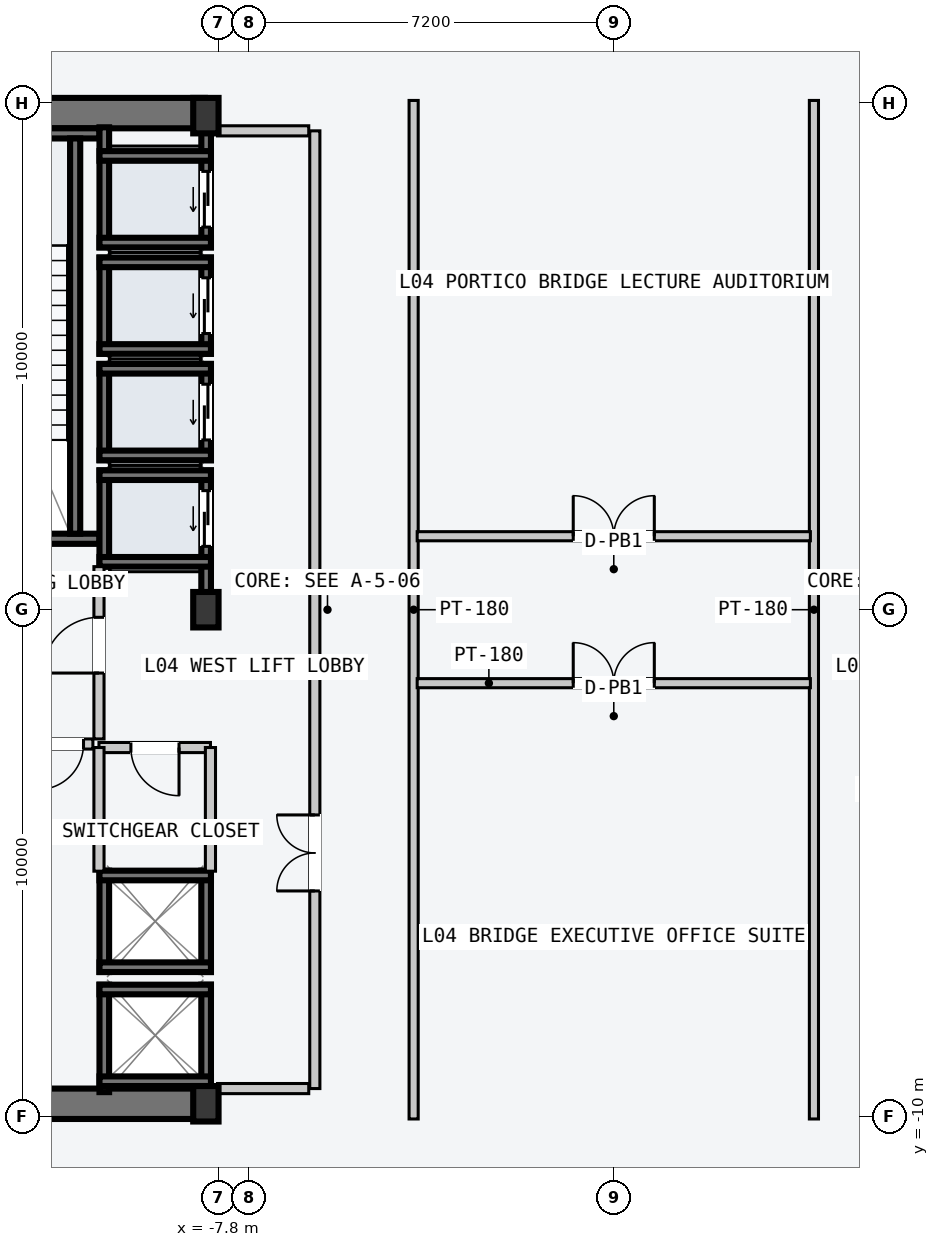
"""IFC4 building model, lengths in metres.
Left out: names, types, materials, properties, quantities, classifications, styles, units other than length and angle.
Written with IfcOpenShell. Run it as: python <this file> out.ifc"""

import sys

from ifc_helpers import new_model, si_unit, direction, frame, frame_2d, origin, origin_2d, place, context, subcontext, project, spatial, rectangle, i_section, extrude, element, fill, save


model = new_model("IFC4")
c1 = context("Model", 3, precision=1e-05, world=origin(), true_north=direction((0.0, 1.0)))
c2 = subcontext(c1, "Body", "Model", "MODEL_VIEW")
j1 = project(units=[si_unit("LENGTHUNIT", "METRE"), si_unit("PLANEANGLEUNIT", "RADIAN")], contexts=[c1])
p1 = place(None, origin())
s1 = spatial("IfcSite", under=j1, at=p1, CompositionType="ELEMENT")
p2 = place(p1, origin())
s2 = spatial("IfcBuilding", under=s1, at=p2, CompositionType="ELEMENT")
p3 = place(p2, frame((0.0, 0.0, 19.2)))
s3 = spatial("IfcBuildingStorey", under=s2, at=p3, CompositionType="ELEMENT", Elevation=19.2)
for number, where, z_axis, x_axis in (
    (1, (-14.53, -9.75, -0.22), (0.0, 0.0, 1.0), (1.0, 0.0, 0.0)),
    (2, (-14.53, 9.8, -0.22), (0.0, 0.0, 1.0), (1.0, 0.0, 0.0)),
):
    element("IfcWall", number, at=place(p3, frame(where, z_axis=z_axis, x_axis=x_axis)), inside=s3, PredefinedType="SHEAR", context=c2, shape_type="SweptSolid", body=[
        extrude(rectangle(XDim=6.46, YDim=0.6, at=frame_2d((3.23, 0.0))), origin(), (0.0, 0.0, 1.0), 4.82),
    ])
p4 = place(p3, frame((-14.25, 1.4, -0.22), z_axis=(0.0, 0.0, 1.0), x_axis=(1.0, 0.0, 0.0)))
e3 = element("IfcWall", 3, at=p4, inside=s3, PredefinedType="SOLIDWALL", context=c2, shape_type="SweptSolid", body=[
    extrude(rectangle(XDim=4.1, YDim=0.2, at=frame_2d((2.05, 0.0))), origin(), (0.0, 0.0, 1.0), 4.82),
])
p5 = place(p4, frame((1.5, 0.0, 0.22)))
e4 = element("IfcOpeningElement", 4, at=p5, cuts=e3, PredefinedType="OPENING", context=c2, shape_type="SweptSolid", body=[
    extrude(rectangle(XDim=1.12, YDim=2.18, at=frame_2d((0.56, 1.09))), frame((0.0, 0.11, 0.0), z_axis=(0.0, -1.0, 0.0), x_axis=(1.0, 0.0, 0.0)), (0.0, 0.0, 1.0), 0.22),
])
p6 = place(p3, frame((-14.25, 9.4, -0.22), z_axis=(0.0, 0.0, 1.0), x_axis=(1.0, 0.0, 0.0)))
e5 = element("IfcWall", 5, at=p6, inside=s3, PredefinedType="SOLIDWALL", context=c2, shape_type="SweptSolid", body=[
    extrude(rectangle(XDim=4.1, YDim=0.2, at=frame_2d((2.05, 0.0))), origin(), (0.0, 0.0, 1.0), 4.82),
])
p7 = place(p3, frame((-10.63, 1.5, -0.22), z_axis=(0.0, 0.0, 1.0), x_axis=(0.0, 1.0, 0.0)))
e6 = element("IfcWall", 6, at=p7, inside=s3, PredefinedType="SOLIDWALL", context=c2, shape_type="SweptSolid", body=[
    extrude(rectangle(XDim=7.8, YDim=0.2, at=frame_2d((3.9, 0.0))), origin(), (0.0, 0.0, 1.0), 4.82),
])
for number, where, z_axis, x_axis in (
    (7, (-8.05, -9.75, 0.0), (0.0, 0.0, 1.0), (1.0, 0.0, 0.0)),
    (8, (-8.05, 0.0, 0.0), (0.0, 0.0, 1.0), (1.0, 0.0, 0.0)),
    (9, (-8.05, 9.75, 0.0), (0.0, 0.0, 1.0), (1.0, 0.0, 0.0)),
):
    element("IfcColumn", number, at=place(p3, frame(where, z_axis=z_axis, x_axis=x_axis)), inside=s3, PredefinedType="COLUMN", context=c2, shape_type="SweptSolid", body=[
        extrude(i_section(OverallWidth=0.5, OverallDepth=0.7, WebThickness=0.028, FlangeThickness=0.045, at=origin_2d()), origin(), (0.0, 0.0, 1.0), 4.8),
    ])
p8 = place(p3, frame((-8.045, 0.21, -0.22), z_axis=(0.0, 0.0, 1.0), x_axis=(0.0, 1.0, 0.0)))
e10 = element("IfcWall", 10, at=p8, inside=s3, PredefinedType="SOLIDWALL", context=c2, shape_type="SweptSolid", body=[
    extrude(rectangle(XDim=2.54, YDim=0.19, at=frame_2d((1.27, 0.0))), origin(), (0.0, 0.0, 1.0), 4.82),
])
p9 = place(p8, frame((1.04, 0.0, 0.22)))
e11 = element("IfcOpeningElement", 11, at=p9, cuts=e10, PredefinedType="OPENING", context=c2, shape_type="SweptSolid", body=[
    extrude(rectangle(XDim=1.1, YDim=2.2, at=frame_2d((0.55, 1.1))), frame((0.0, 0.105, 0.0), z_axis=(0.0, -1.0, 0.0), x_axis=(1.0, 0.0, 0.0)), (0.0, 0.0, 1.0), 0.21),
])
p10 = place(p3, frame((-10.055, 0.85, -0.22), z_axis=(0.0, 0.0, 1.0), x_axis=(0.0, 1.0, 0.0)))
e12 = element("IfcWall", 12, at=p10, inside=s3, PredefinedType="SOLIDWALL", context=c2, shape_type="SweptSolid", body=[
    extrude(rectangle(XDim=1.9, YDim=0.19, at=frame_2d((0.95, 0.0))), origin(), (0.0, 0.0, 1.0), 4.82),
])
for number, where, z_axis, x_axis in (
    (13, (-10.15, 2.655, -0.22), (0.0, 0.0, 1.0), (1.0, 0.0, 0.0)),
    (14, (-10.15, 0.945, -0.22), (0.0, 0.0, 1.0), (1.0, 0.0, 0.0)),
):
    element("IfcWall", number, at=place(p3, frame(where, z_axis=z_axis, x_axis=x_axis)), inside=s3, PredefinedType="SOLIDWALL", context=c2, shape_type="SweptSolid", body=[
        extrude(rectangle(XDim=2.2, YDim=0.19, at=frame_2d((1.1, 0.0))), origin(), (0.0, 0.0, 1.0), 4.82),
    ])
p11 = place(p3, frame((-8.045, 2.95, -0.22), z_axis=(0.0, 0.0, 1.0), x_axis=(0.0, 1.0, 0.0)))
e15 = element("IfcWall", 15, at=p11, inside=s3, PredefinedType="SOLIDWALL", context=c2, shape_type="SweptSolid", body=[
    extrude(rectangle(XDim=1.9, YDim=0.19, at=frame_2d((0.95, 0.0))), origin(), (0.0, 0.0, 1.0), 4.82),
])
p12 = place(p11, frame((0.4, 0.0, 0.22)))
e16 = element("IfcOpeningElement", 16, at=p12, cuts=e15, PredefinedType="OPENING", context=c2, shape_type="SweptSolid", body=[
    extrude(rectangle(XDim=1.1, YDim=2.2, at=frame_2d((0.55, 1.1))), frame((0.0, 0.105, 0.0), z_axis=(0.0, -1.0, 0.0), x_axis=(1.0, 0.0, 0.0)), (0.0, 0.0, 1.0), 0.21),
])
p13 = place(p3, frame((-10.055, 2.95, -0.22), z_axis=(0.0, 0.0, 1.0), x_axis=(0.0, 1.0, 0.0)))
e17 = element("IfcWall", 17, at=p13, inside=s3, PredefinedType="SOLIDWALL", context=c2, shape_type="SweptSolid", body=[
    extrude(rectangle(XDim=1.9, YDim=0.19, at=frame_2d((0.95, 0.0))), origin(), (0.0, 0.0, 1.0), 4.82),
])
for number, where, z_axis, x_axis in (
    (18, (-10.15, 4.755, -0.22), (0.0, 0.0, 1.0), (1.0, 0.0, 0.0)),
    (19, (-10.15, 3.045, -0.22), (0.0, 0.0, 1.0), (1.0, 0.0, 0.0)),
):
    element("IfcWall", number, at=place(p3, frame(where, z_axis=z_axis, x_axis=x_axis)), inside=s3, PredefinedType="SOLIDWALL", context=c2, shape_type="SweptSolid", body=[
        extrude(rectangle(XDim=2.2, YDim=0.19, at=frame_2d((1.1, 0.0))), origin(), (0.0, 0.0, 1.0), 4.82),
    ])
p14 = place(p3, frame((-8.045, 5.05, -0.22), z_axis=(0.0, 0.0, 1.0), x_axis=(0.0, 1.0, 0.0)))
e20 = element("IfcWall", 20, at=p14, inside=s3, PredefinedType="SOLIDWALL", context=c2, shape_type="SweptSolid", body=[
    extrude(rectangle(XDim=1.9, YDim=0.19, at=frame_2d((0.95, 0.0))), origin(), (0.0, 0.0, 1.0), 4.82),
])
p15 = place(p14, frame((0.4, 0.0, 0.22)))
e21 = element("IfcOpeningElement", 21, at=p15, cuts=e20, PredefinedType="OPENING", context=c2, shape_type="SweptSolid", body=[
    extrude(rectangle(XDim=1.1, YDim=2.2, at=frame_2d((0.55, 1.1))), frame((0.0, 0.105, 0.0), z_axis=(0.0, -1.0, 0.0), x_axis=(1.0, 0.0, 0.0)), (0.0, 0.0, 1.0), 0.21),
])
p16 = place(p3, frame((-10.055, 5.05, -0.22), z_axis=(0.0, 0.0, 1.0), x_axis=(0.0, 1.0, 0.0)))
e22 = element("IfcWall", 22, at=p16, inside=s3, PredefinedType="SOLIDWALL", context=c2, shape_type="SweptSolid", body=[
    extrude(rectangle(XDim=1.9, YDim=0.19, at=frame_2d((0.95, 0.0))), origin(), (0.0, 0.0, 1.0), 4.82),
])
for number, where, z_axis, x_axis in (
    (23, (-10.15, 6.855, -0.22), (0.0, 0.0, 1.0), (1.0, 0.0, 0.0)),
    (24, (-10.15, 5.145, -0.22), (0.0, 0.0, 1.0), (1.0, 0.0, 0.0)),
):
    element("IfcWall", number, at=place(p3, frame(where, z_axis=z_axis, x_axis=x_axis)), inside=s3, PredefinedType="SOLIDWALL", context=c2, shape_type="SweptSolid", body=[
        extrude(rectangle(XDim=2.2, YDim=0.19, at=frame_2d((1.1, 0.0))), origin(), (0.0, 0.0, 1.0), 4.82),
    ])
p17 = place(p3, frame((-8.045, 7.15, -0.22), z_axis=(0.0, 0.0, 1.0), x_axis=(0.0, 1.0, 0.0)))
e25 = element("IfcWall", 25, at=p17, inside=s3, PredefinedType="SOLIDWALL", context=c2, shape_type="SweptSolid", body=[
    extrude(rectangle(XDim=2.37, YDim=0.19, at=frame_2d((1.185, 0.0))), origin(), (0.0, 0.0, 1.0), 4.82),
])
p18 = place(p17, frame((0.4, 0.0, 0.22)))
e26 = element("IfcOpeningElement", 26, at=p18, cuts=e25, PredefinedType="OPENING", context=c2, shape_type="SweptSolid", body=[
    extrude(rectangle(XDim=1.1, YDim=2.2, at=frame_2d((0.55, 1.1))), frame((0.0, 0.105, 0.0), z_axis=(0.0, -1.0, 0.0), x_axis=(1.0, 0.0, 0.0)), (0.0, 0.0, 1.0), 0.21),
])
p19 = place(p3, frame((-10.055, 7.15, -0.22), z_axis=(0.0, 0.0, 1.0), x_axis=(0.0, 1.0, 0.0)))
e27 = element("IfcWall", 27, at=p19, inside=s3, PredefinedType="SOLIDWALL", context=c2, shape_type="SweptSolid", body=[
    extrude(rectangle(XDim=2.37, YDim=0.19, at=frame_2d((1.185, 0.0))), origin(), (0.0, 0.0, 1.0), 4.82),
])
for number, where, z_axis, x_axis in (
    (28, (-10.15, 8.955, -0.22), (0.0, 0.0, 1.0), (1.0, 0.0, 0.0)),
    (29, (-10.15, 7.245, -0.22), (0.0, 0.0, 1.0), (1.0, 0.0, 0.0)),
):
    element("IfcWall", number, at=place(p3, frame(where, z_axis=z_axis, x_axis=x_axis)), inside=s3, PredefinedType="SOLIDWALL", context=c2, shape_type="SweptSolid", body=[
        extrude(rectangle(XDim=2.2, YDim=0.19, at=frame_2d((1.1, 0.0))), origin(), (0.0, 0.0, 1.0), 4.82),
    ])
for number, where, z_axis, x_axis in (
    (30, (-8.045, -9.52, -0.22), (0.0, 0.0, 1.0), (0.0, 1.0, 0.0)),
    (31, (-10.055, -9.52, -0.22), (0.0, 0.0, 1.0), (0.0, 1.0, 0.0)),
):
    element("IfcWall", number, at=place(p3, frame(where, z_axis=z_axis, x_axis=x_axis)), inside=s3, PredefinedType="SOLIDWALL", context=c2, shape_type="SweptSolid", body=[
        extrude(rectangle(XDim=2.12, YDim=0.19, at=frame_2d((1.06, 0.0))), origin(), (0.0, 0.0, 1.0), 4.82),
    ])
for number, where, z_axis, x_axis in (
    (32, (-10.15, -7.495, -0.22), (0.0, 0.0, 1.0), (1.0, 0.0, 0.0)),
    (33, (-10.15, -9.305, -0.22), (0.0, 0.0, 1.0), (1.0, 0.0, 0.0)),
):
    element("IfcWall", number, at=place(p3, frame(where, z_axis=z_axis, x_axis=x_axis)), inside=s3, PredefinedType="SOLIDWALL", context=c2, shape_type="SweptSolid", body=[
        extrude(rectangle(XDim=2.2, YDim=0.19, at=frame_2d((1.1, 0.0))), origin(), (0.0, 0.0, 1.0), 4.82),
    ])
for number, where, z_axis, x_axis in (
    (34, (-8.045, -7.15, -0.22), (0.0, 0.0, 1.0), (0.0, 1.0, 0.0)),
    (35, (-10.055, -7.15, -0.22), (0.0, 0.0, 1.0), (0.0, 1.0, 0.0)),
):
    element("IfcWall", number, at=place(p3, frame(where, z_axis=z_axis, x_axis=x_axis)), inside=s3, PredefinedType="SOLIDWALL", context=c2, shape_type="SweptSolid", body=[
        extrude(rectangle(XDim=2.0, YDim=0.19, at=frame_2d((1.0, 0.0))), origin(), (0.0, 0.0, 1.0), 4.82),
    ])
for number, where, z_axis, x_axis in (
    (36, (-10.15, -5.245, -0.22), (0.0, 0.0, 1.0), (1.0, 0.0, 0.0)),
    (37, (-10.15, -7.055, -0.22), (0.0, 0.0, 1.0), (1.0, 0.0, 0.0)),
):
    element("IfcWall", number, at=place(p3, frame(where, z_axis=z_axis, x_axis=x_axis)), inside=s3, PredefinedType="SOLIDWALL", context=c2, shape_type="SweptSolid", body=[
        extrude(rectangle(XDim=2.2, YDim=0.19, at=frame_2d((1.1, 0.0))), origin(), (0.0, 0.0, 1.0), 4.82),
    ])
p20 = place(p3, frame((-5.9, -9.45, 0.0), z_axis=(0.0, 0.0, 1.0), x_axis=(0.0, 1.0, 0.0)))
e38 = element("IfcWall", 38, at=p20, inside=s3, PredefinedType="PARTITIONING", context=c2, shape_type="SweptSolid", body=[
    extrude(rectangle(XDim=18.9, YDim=0.2, at=frame_2d((9.45, 0.0))), origin(), (0.0, 0.0, 1.0), 4.6),
])
p21 = place(p20, frame((3.9, 0.0, 0.0)))
e39 = element("IfcOpeningElement", 39, at=p21, cuts=e38, PredefinedType="OPENING", context=c2, shape_type="SweptSolid", body=[
    extrude(rectangle(XDim=1.5, YDim=2.2, at=frame_2d((0.75, 1.1))), frame((0.0, 0.11, 0.0), z_axis=(0.0, -1.0, 0.0), x_axis=(1.0, 0.0, 0.0)), (0.0, 0.0, 1.0), 0.22),
])
for number, where, z_axis, x_axis in (
    (40, (-6.02, -9.45, 0.0), (0.0, 0.0, 1.0), (-1.0, 0.0, 0.0)),
    (41, (-6.02, 9.45, 0.0), (0.0, 0.0, 1.0), (-1.0, 0.0, 0.0)),
):
    element("IfcWall", number, at=place(p3, frame(where, z_axis=z_axis, x_axis=x_axis)), inside=s3, PredefinedType="PARTITIONING", context=c2, shape_type="SweptSolid", body=[
        extrude(rectangle(XDim=1.8, YDim=0.2, at=frame_2d((0.9, 0.0))), origin(), (0.0, 0.0, 1.0), 2.92),
    ])
p22 = place(p3, frame((-10.16, -2.55, 0.0), z_axis=(0.0, 0.0, 1.0), x_axis=(0.0, 1.0, 0.0)))
e42 = element("IfcWall", 42, at=p22, inside=s3, PredefinedType="PARTITIONING", context=c2, shape_type="SweptSolid", body=[
    extrude(rectangle(XDim=3.4, YDim=0.2, at=frame_2d((1.7, 0.0))), origin(), (0.0, 0.0, 1.0), 4.6),
])
p23 = place(p22, frame((1.3, 0.0, 0.0)))
e43 = element("IfcOpeningElement", 43, at=p23, cuts=e42, PredefinedType="OPENING", context=c2, shape_type="SweptSolid", body=[
    extrude(rectangle(XDim=1.1, YDim=2.15, at=frame_2d((0.55, 1.075))), frame((0.0, 0.11, 0.0), z_axis=(0.0, -1.0, 0.0), x_axis=(1.0, 0.0, 0.0)), (0.0, 0.0, 1.0), 0.22),
])
p24 = place(p3, frame((-10.28, -2.65, 0.0), z_axis=(0.0, 0.0, 1.0), x_axis=(-1.0, 0.0, 0.0)))
e44 = element("IfcWall", 44, at=p24, inside=s3, PredefinedType="PARTITIONING", context=c2, shape_type="SweptSolid", body=[
    extrude(rectangle(XDim=1.27, YDim=0.2, at=frame_2d((0.635, 0.0))), origin(), (0.0, 0.0, 1.0), 4.6),
])
p25 = place(p24, frame((0.185, 0.0, 0.0)))
e45 = element("IfcOpeningElement", 45, at=p25, cuts=e44, PredefinedType="OPENING", context=c2, shape_type="SweptSolid", body=[
    extrude(rectangle(XDim=0.9, YDim=2.15, at=frame_2d((0.45, 1.075))), frame((0.0, 0.11, 0.0), z_axis=(0.0, -1.0, 0.0), x_axis=(1.0, 0.0, 0.0)), (0.0, 0.0, 1.0), 0.22),
])
p26 = place(p3, frame((-7.96, -2.72, 0.0), z_axis=(0.0, 0.0, 1.0), x_axis=(-1.0, 0.0, 0.0)))
e46 = element("IfcWall", 46, at=p26, inside=s3, PredefinedType="PARTITIONING", context=c2, shape_type="SweptSolid", body=[
    extrude(rectangle(XDim=2.2, YDim=0.2, at=frame_2d((1.1, 0.0))), origin(), (0.0, 0.0, 1.0), 4.6),
])
p27 = place(p26, frame((0.62, 0.0, 0.0)))
e47 = element("IfcOpeningElement", 47, at=p27, cuts=e46, PredefinedType="OPENING", context=c2, shape_type="SweptSolid", body=[
    extrude(rectangle(XDim=0.95, YDim=2.1, at=frame_2d((0.475, 1.05))), frame((0.0, 0.11, 0.0), z_axis=(0.0, -1.0, 0.0), x_axis=(1.0, 0.0, 0.0)), (0.0, 0.0, 1.0), 0.22),
])
for number, where, z_axis, x_axis in (
    (48, (-7.96, -5.16, 0.0), (0.0, 0.0, 1.0), (0.0, 1.0, 0.0)),
    (49, (-10.16, -5.16, 0.0), (0.0, 0.0, 1.0), (0.0, 1.0, 0.0)),
):
    element("IfcWall", number, at=place(p3, frame(where, z_axis=z_axis, x_axis=x_axis)), inside=s3, PredefinedType="PARTITIONING", context=c2, shape_type="SweptSolid", body=[
        extrude(rectangle(XDim=2.44, YDim=0.2, at=frame_2d((1.22, 0.0))), origin(), (0.0, 0.0, 1.0), 4.6),
    ])
for number, where, z_axis, x_axis in (
    (50, (-3.95, -10.05, 0.0), (0.0, 0.0, 1.0), (0.0, 1.0, 0.0)),
    (51, (3.95, -10.05, 0.0), (0.0, 0.0, 1.0), (0.0, 1.0, 0.0)),
):
    element("IfcWall", number, at=place(p3, frame(where, z_axis=z_axis, x_axis=x_axis)), inside=s3, PredefinedType="PARTITIONING", context=c2, shape_type="SweptSolid", body=[
        extrude(rectangle(XDim=20.1, YDim=0.18, at=frame_2d((10.05, 0.0))), origin(), (0.0, 0.0, 1.0), 4.6),
    ])
p28 = place(p3, frame((-3.88, 1.45, 0.0), z_axis=(0.0, 0.0, 1.0), x_axis=(1.0, 0.0, 0.0)))
e52 = element("IfcWall", 52, at=p28, inside=s3, PredefinedType="PARTITIONING", context=c2, shape_type="SweptSolid", body=[
    extrude(rectangle(XDim=7.76, YDim=0.18, at=frame_2d((3.88, 0.0))), origin(), (0.0, 0.0, 1.0), 4.6),
])
p29 = place(p28, frame((3.08, 0.0, 0.0)))
e53 = element("IfcOpeningElement", 53, at=p29, cuts=e52, PredefinedType="OPENING", context=c2, shape_type="SweptSolid", body=[
    extrude(rectangle(XDim=1.6, YDim=2.3, at=frame_2d((0.8, 1.15))), frame((0.0, 0.1, 0.0), z_axis=(0.0, -1.0, 0.0), x_axis=(1.0, 0.0, 0.0)), (0.0, 0.0, 1.0), 0.2),
])
p30 = place(p3, frame((-3.88, -1.45, 0.0), z_axis=(0.0, 0.0, 1.0), x_axis=(1.0, 0.0, 0.0)))
e54 = element("IfcWall", 54, at=p30, inside=s3, PredefinedType="PARTITIONING", context=c2, shape_type="SweptSolid", body=[
    extrude(rectangle(XDim=7.76, YDim=0.18, at=frame_2d((3.88, 0.0))), origin(), (0.0, 0.0, 1.0), 4.6),
])
p31 = place(p30, frame((3.08, 0.0, 0.0)))
e55 = element("IfcOpeningElement", 55, at=p31, cuts=e54, PredefinedType="OPENING", context=c2, shape_type="SweptSolid", body=[
    extrude(rectangle(XDim=1.6, YDim=2.3, at=frame_2d((0.8, 1.15))), frame((0.0, 0.1, 0.0), z_axis=(0.0, -1.0, 0.0), x_axis=(1.0, 0.0, 0.0)), (0.0, 0.0, 1.0), 0.2),
])
p32 = place(p9, origin())
e56 = element("IfcDoor", 56, at=p32, inside=s3, OperationType="SLIDING_TO_LEFT", PredefinedType="DOOR", context=c2, shape_type="SweptSolid", body=[
    extrude(rectangle(XDim=1.1, YDim=2.2, at=frame_2d((0.55, 1.1))), frame((0.0, 0.025, 0.0), z_axis=(0.0, -1.0, 0.0), x_axis=(1.0, 0.0, 0.0)), (0.0, 0.0, 1.0), 0.05),
])
fill(e11, e56)
p33 = place(p12, origin())
e57 = element("IfcDoor", 57, at=p33, inside=s3, OperationType="SLIDING_TO_LEFT", PredefinedType="DOOR", context=c2, shape_type="SweptSolid", body=[
    extrude(rectangle(XDim=1.1, YDim=2.2, at=frame_2d((0.55, 1.1))), frame((0.0, 0.025, 0.0), z_axis=(0.0, -1.0, 0.0), x_axis=(1.0, 0.0, 0.0)), (0.0, 0.0, 1.0), 0.05),
])
fill(e16, e57)
p34 = place(p15, origin())
e58 = element("IfcDoor", 58, at=p34, inside=s3, OperationType="SLIDING_TO_LEFT", PredefinedType="DOOR", context=c2, shape_type="SweptSolid", body=[
    extrude(rectangle(XDim=1.1, YDim=2.2, at=frame_2d((0.55, 1.1))), frame((0.0, 0.025, 0.0), z_axis=(0.0, -1.0, 0.0), x_axis=(1.0, 0.0, 0.0)), (0.0, 0.0, 1.0), 0.05),
])
fill(e21, e58)
p35 = place(p18, origin())
e59 = element("IfcDoor", 59, at=p35, inside=s3, OperationType="SLIDING_TO_LEFT", PredefinedType="DOOR", context=c2, shape_type="SweptSolid", body=[
    extrude(rectangle(XDim=1.1, YDim=2.2, at=frame_2d((0.55, 1.1))), frame((0.0, 0.025, 0.0), z_axis=(0.0, -1.0, 0.0), x_axis=(1.0, 0.0, 0.0)), (0.0, 0.0, 1.0), 0.05),
])
fill(e26, e59)
p36 = place(p21, origin())
e60 = element("IfcDoor", 60, at=p36, inside=s3, OperationType="DOUBLE_DOOR_SINGLE_SWING", PredefinedType="DOOR", context=c2, shape_type="SweptSolid", body=[
    extrude(rectangle(XDim=1.5, YDim=2.2, at=frame_2d((0.75, 1.1))), frame((0.0, 0.025, 0.0), z_axis=(0.0, -1.0, 0.0), x_axis=(1.0, 0.0, 0.0)), (0.0, 0.0, 1.0), 0.05),
])
fill(e39, e60)
p37 = place(p23, origin())
e61 = element("IfcDoor", 61, at=p37, inside=s3, OperationType="SINGLE_SWING_LEFT", PredefinedType="DOOR", context=c2, shape_type="SweptSolid", body=[
    extrude(rectangle(XDim=1.1, YDim=2.15, at=frame_2d((0.55, 1.075))), frame((0.0, 0.025, 0.0), z_axis=(0.0, -1.0, 0.0), x_axis=(1.0, 0.0, 0.0)), (0.0, 0.0, 1.0), 0.05),
])
fill(e43, e61)
p38 = place(p25, origin())
e62 = element("IfcDoor", 62, at=p38, inside=s3, OperationType="SINGLE_SWING_RIGHT", PredefinedType="DOOR", context=c2, shape_type="SweptSolid", body=[
    extrude(rectangle(XDim=0.9, YDim=2.15, at=frame_2d((0.45, 1.075))), frame((0.0, 0.025, 0.0), z_axis=(0.0, -1.0, 0.0), x_axis=(1.0, 0.0, 0.0)), (0.0, 0.0, 1.0), 0.05),
])
fill(e45, e62)
p39 = place(p27, origin())
e63 = element("IfcDoor", 63, at=p39, inside=s3, OperationType="SINGLE_SWING_LEFT", PredefinedType="DOOR", context=c2, shape_type="SweptSolid", body=[
    extrude(rectangle(XDim=0.95, YDim=2.1, at=frame_2d((0.475, 1.05))), frame((0.0, 0.025, 0.0), z_axis=(0.0, -1.0, 0.0), x_axis=(1.0, 0.0, 0.0)), (0.0, 0.0, 1.0), 0.05),
])
fill(e47, e63)
p40 = place(p29, origin())
e64 = element("IfcDoor", 64, at=p40, inside=s3, OperationType="DOUBLE_DOOR_SINGLE_SWING", PredefinedType="DOOR", context=c2, shape_type="SweptSolid", body=[
    extrude(rectangle(XDim=1.6, YDim=2.3, at=frame_2d((0.8, 1.15))), frame((0.0, 0.025, 0.0), z_axis=(0.0, -1.0, 0.0), x_axis=(1.0, 0.0, 0.0)), (0.0, 0.0, 1.0), 0.05),
])
fill(e53, e64)
p41 = place(p31, origin())
e65 = element("IfcDoor", 65, at=p41, inside=s3, OperationType="DOUBLE_DOOR_SINGLE_SWING", PredefinedType="DOOR", context=c2, shape_type="SweptSolid", body=[
    extrude(rectangle(XDim=1.6, YDim=2.3, at=frame_2d((0.8, 1.15))), frame((0.0, 0.025, 0.0), z_axis=(0.0, -1.0, 0.0), x_axis=(1.0, 0.0, 0.0)), (0.0, 0.0, 1.0), 0.05),
])
fill(e55, e65)
save(model, sys.argv[1])
